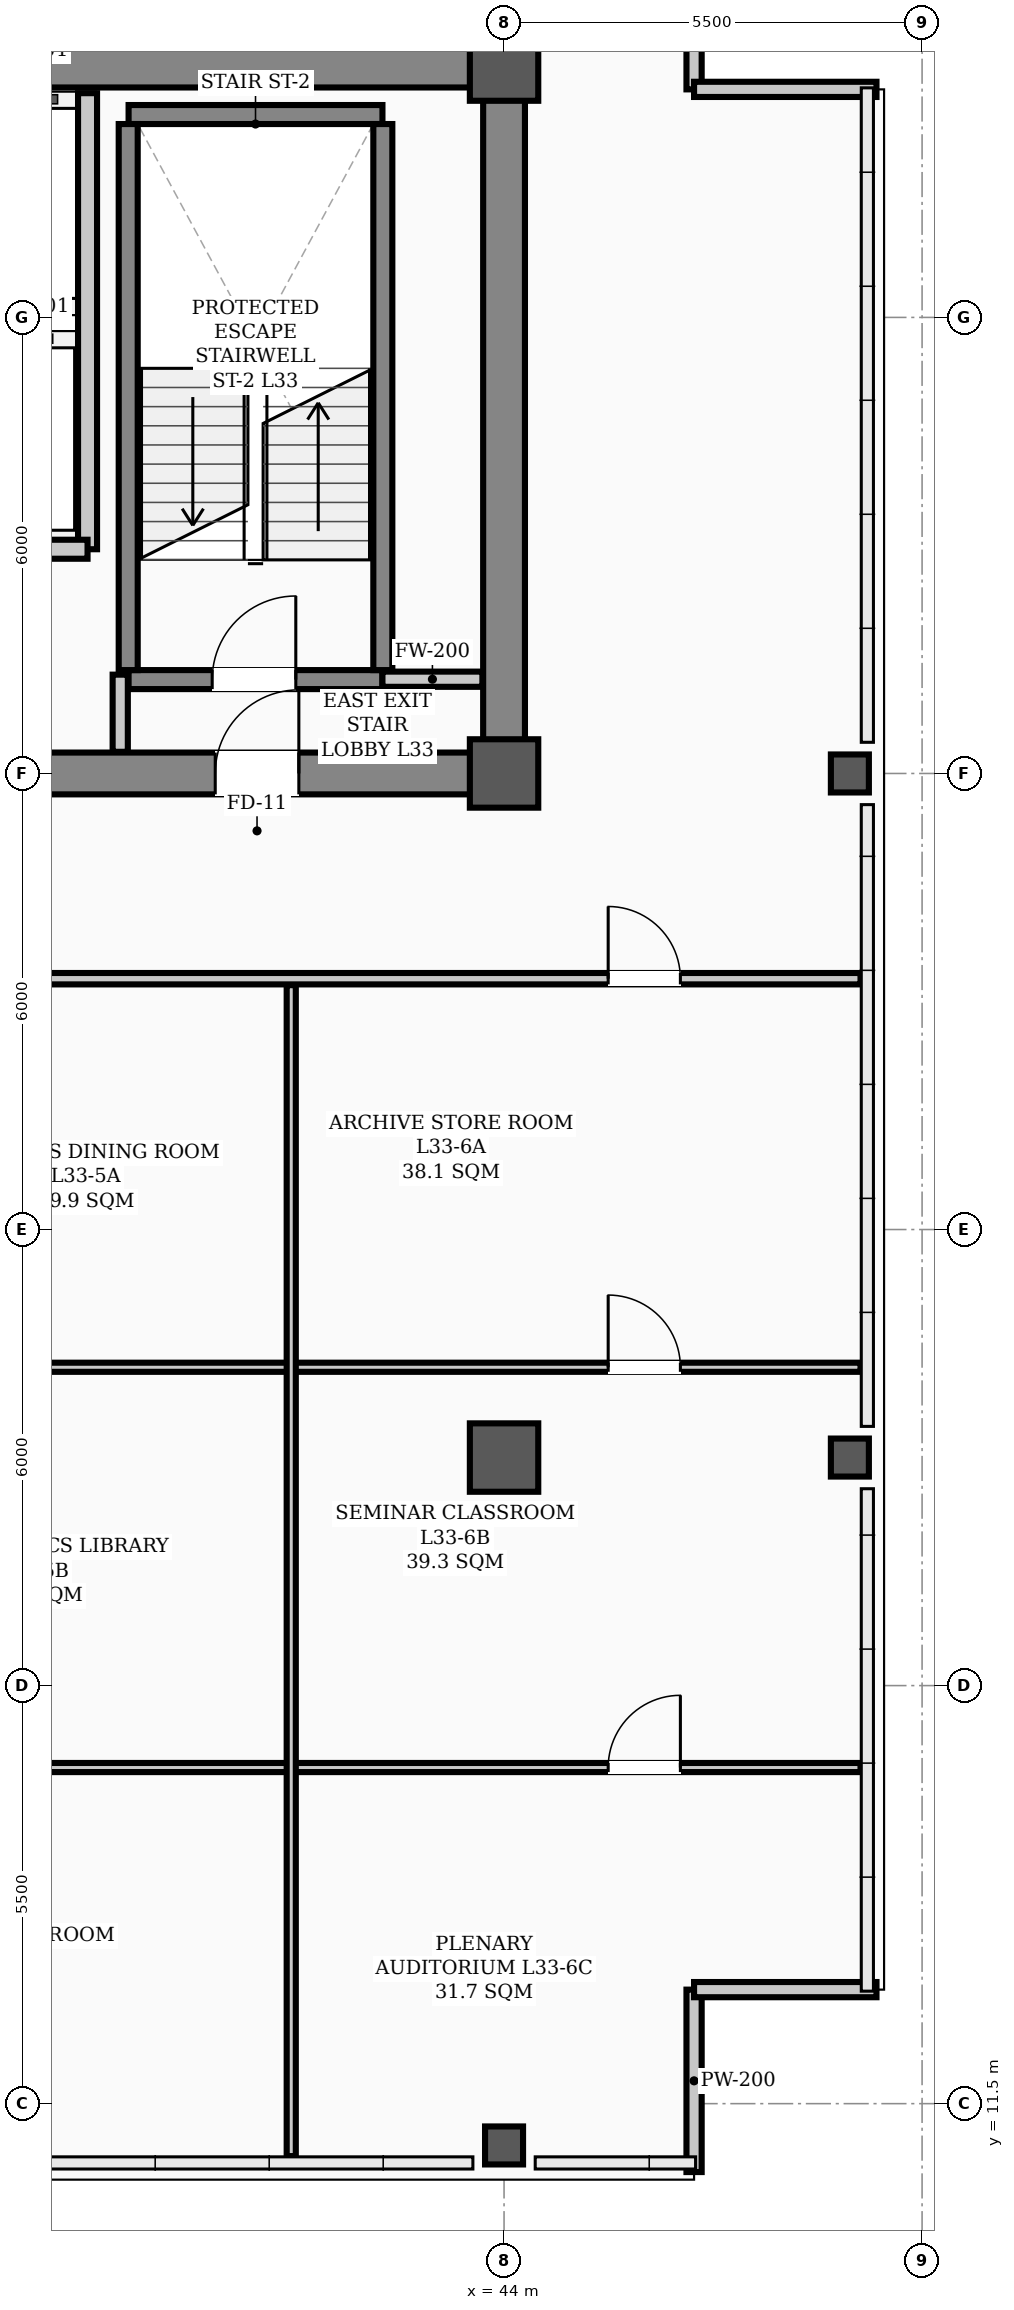
"""IFC4 building model, lengths in metres.
Left out: names, types, materials, properties, quantities, classifications, styles, units other than length and angle.
Written with IfcOpenShell. Run it as: python <this file> out.ifc"""

import sys

from ifc_helpers import new_model, si_unit, direction, frame, frame_2d, origin, origin_2d, place, context, subcontext, project, spatial, rectangle, hollow_rectangle, extrude, element, fill, save


model = new_model("IFC4")
c1 = context("Model", 3, precision=1e-05, world=origin(), true_north=direction((0.0, 1.0)))
c2 = subcontext(c1, "Body", "Model", "MODEL_VIEW")
j1 = project(units=[si_unit("LENGTHUNIT", "METRE"), si_unit("PLANEANGLEUNIT", "RADIAN")], contexts=[c1])
p1 = place(None, origin())
s1 = spatial("IfcSite", under=j1, at=p1, CompositionType="ELEMENT")
p2 = place(p1, origin())
s2 = spatial("IfcBuilding", under=s1, at=p2, CompositionType="ELEMENT")
p3 = place(p2, frame((0.0, 0.0, 134.4)))
s3 = spatial("IfcBuildingStorey", under=s2, at=p3, CompositionType="ELEMENT", Elevation=134.4)
for number, where, z_axis, x_axis in (
    (1, (44.0, 29.0, 0.0), (0.0, 0.0, 1.0), (1.0, 0.0, 0.0)),
    (2, (44.0, 38.3, 0.0), (0.0, 0.0, 1.0), (1.0, 0.0, 0.0)),
    (3, (44.0, 20.0, 0.0), (0.0, 0.0, 1.0), (1.0, 0.0, 0.0)),
):
    element("IfcColumn", number, at=place(p3, frame(where, z_axis=z_axis, x_axis=x_axis)), inside=s3, PredefinedType="COLUMN", context=c2, shape_type="SweptSolid", body=[
        extrude(hollow_rectangle(XDim=0.9, YDim=0.9, WallThickness=0.035, InnerFilletRadius=0.017, OuterFilletRadius=0.052, at=origin_2d()), origin(), (0.0, 0.0, 1.0), 3.9),
    ])
for number, where, z_axis, x_axis in (
    (4, (44.0, 10.95, 0.0), (0.0, 0.0, 1.0), (1.0, 0.0, 0.0)),
    (5, (48.55, 20.0, 0.0), (0.0, 0.0, 1.0), (1.0, 0.0, 0.0)),
    (6, (48.55, 29.0, 0.0), (0.0, 0.0, 1.0), (1.0, 0.0, 0.0)),
):
    element("IfcColumn", number, at=place(p3, frame(where, z_axis=z_axis, x_axis=x_axis)), inside=s3, PredefinedType="COLUMN", context=c2, shape_type="SweptSolid", body=[
        extrude(hollow_rectangle(XDim=0.5, YDim=0.5, WallThickness=0.024, InnerFilletRadius=0.012, OuterFilletRadius=0.036, at=origin_2d()), origin(), (0.0, 0.0, 1.0), 3.9),
    ])
for number, where, z_axis, x_axis in (
    (7, (46.5, 10.6, 0.0), (0.0, 0.0, 1.0), (0.0, 1.0, 0.0)),
    (8, (46.5, 13.0, 0.0), (0.0, 0.0, 1.0), (1.0, 0.0, 0.0)),
    (9, (46.5, 40.4, 0.0), (0.0, 0.0, 1.0), (0.0, -1.0, 0.0)),
    (10, (46.5, 38.0, 0.0), (0.0, 0.0, 1.0), (1.0, 0.0, 0.0)),
):
    element("IfcWall", number, at=place(p3, frame(where, z_axis=z_axis, x_axis=x_axis)), inside=s3, PredefinedType="PARAPET", context=c2, shape_type="SweptSolid", body=[
        extrude(rectangle(XDim=2.4, YDim=0.2, at=frame_2d((1.2, 0.0))), origin(), (0.0, 0.0, 1.0), 1.2),
    ])
p4 = place(p3, frame((13.5, 29.0, 0.0), z_axis=(0.0, 0.0, 1.0), x_axis=(1.0, 0.0, 0.0)))
e11 = element("IfcWall", 11, at=p4, inside=s3, PredefinedType="SHEAR", context=c2, shape_type="SweptSolid", body=[
    extrude(rectangle(XDim=30.5, YDim=0.55, at=frame_2d((15.25, 0.0))), origin(), (0.0, 0.0, 1.0), 3.72),
])
p5 = place(p4, frame((1.75, 0.0, 0.0)))
e12 = element("IfcOpeningElement", 12, at=p5, cuts=e11, PredefinedType="OPENING", context=c2, shape_type="SweptSolid", body=[
    extrude(rectangle(XDim=1.1, YDim=2.08, at=frame_2d((0.55, 1.04))), frame((0.0, 0.285, 0.0), z_axis=(0.0, -1.0, 0.0), x_axis=(1.0, 0.0, 0.0)), (0.0, 0.0, 1.0), 0.57),
])
p6 = place(p4, frame((26.7, 0.0, 0.0)))
e13 = element("IfcOpeningElement", 13, at=p6, cuts=e11, PredefinedType="OPENING", context=c2, shape_type="SweptSolid", body=[
    extrude(rectangle(XDim=1.1, YDim=2.08, at=frame_2d((0.55, 1.04))), frame((0.0, 0.285, 0.0), z_axis=(0.0, -1.0, 0.0), x_axis=(1.0, 0.0, 0.0)), (0.0, 0.0, 1.0), 0.57),
])
p7 = place(p4, frame((6.8, 0.0, 0.0)))
e14 = element("IfcOpeningElement", 14, at=p7, cuts=e11, PredefinedType="OPENING", context=c2, shape_type="SweptSolid", body=[
    extrude(rectangle(XDim=1.1, YDim=2.08, at=frame_2d((0.55, 1.04))), frame((0.0, 0.285, 0.0), z_axis=(0.0, -1.0, 0.0), x_axis=(1.0, 0.0, 0.0)), (0.0, 0.0, 1.0), 0.57),
])
p8 = place(p4, frame((13.2, 0.0, 0.0)))
e15 = element("IfcOpeningElement", 15, at=p8, cuts=e11, PredefinedType="OPENING", context=c2, shape_type="SweptSolid", body=[
    extrude(rectangle(XDim=1.6, YDim=2.08, at=frame_2d((0.8, 1.04))), frame((0.0, 0.285, 0.0), z_axis=(0.0, -1.0, 0.0), x_axis=(1.0, 0.0, 0.0)), (0.0, 0.0, 1.0), 0.57),
])
p9 = place(p4, frame((19.5, 0.0, 0.0)))
e16 = element("IfcOpeningElement", 16, at=p9, cuts=e11, PredefinedType="OPENING", context=c2, shape_type="SweptSolid", body=[
    extrude(rectangle(XDim=0.9, YDim=2.08, at=frame_2d((0.45, 1.04))), frame((0.0, 0.285, 0.0), z_axis=(0.0, -1.0, 0.0), x_axis=(1.0, 0.0, 0.0)), (0.0, 0.0, 1.0), 0.57),
])
p10 = place(p4, frame((21.55, 0.0, 0.0)))
e17 = element("IfcOpeningElement", 17, at=p10, cuts=e11, PredefinedType="OPENING", context=c2, shape_type="SweptSolid", body=[
    extrude(rectangle(XDim=0.9, YDim=2.08, at=frame_2d((0.45, 1.04))), frame((0.0, 0.285, 0.0), z_axis=(0.0, -1.0, 0.0), x_axis=(1.0, 0.0, 0.0)), (0.0, 0.0, 1.0), 0.57),
])
p11 = place(p3, frame((13.5, 38.3, 0.0), z_axis=(0.0, 0.0, 1.0), x_axis=(1.0, 0.0, 0.0)))
e18 = element("IfcWall", 18, at=p11, inside=s3, PredefinedType="SHEAR", context=c2, shape_type="SweptSolid", body=[
    extrude(rectangle(XDim=30.5, YDim=0.55, at=frame_2d((15.25, 0.0))), origin(), (0.0, 0.0, 1.0), 3.72),
])
p12 = place(p3, frame((44.0, 29.35, 0.0), z_axis=(0.0, 0.0, 1.0), x_axis=(0.0, 1.0, 0.0)))
e19 = element("IfcWall", 19, at=p12, inside=s3, PredefinedType="SHEAR", context=c2, shape_type="SweptSolid", body=[
    extrude(rectangle(XDim=8.6, YDim=0.55, at=frame_2d((4.3, 0.0))), origin(), (0.0, 0.0, 1.0), 3.72),
])
p13 = place(p3, frame((39.06, 30.235, 0.0), z_axis=(0.0, 0.0, 1.0), x_axis=(1.0, 0.0, 0.0)))
e20 = element("IfcWall", 20, at=p13, inside=s3, PredefinedType="STANDARD", context=c2, shape_type="SweptSolid", body=[
    extrude(rectangle(XDim=3.34, YDim=0.25, at=frame_2d((1.67, 0.0))), origin(), (0.0, 0.0, 1.0), 3.72),
])
p14 = place(p13, frame((1.1, 0.0, 0.0)))
e21 = element("IfcOpeningElement", 21, at=p14, cuts=e20, PredefinedType="OPENING", context=c2, shape_type="SweptSolid", body=[
    extrude(rectangle(XDim=1.1, YDim=2.08, at=frame_2d((0.55, 1.04))), frame((0.0, 0.135, 0.0), z_axis=(0.0, -1.0, 0.0), x_axis=(1.0, 0.0, 0.0)), (0.0, 0.0, 1.0), 0.27),
])
p15 = place(p3, frame((39.06, 37.669, 0.0), z_axis=(0.0, 0.0, 1.0), x_axis=(1.0, 0.0, 0.0)))
e22 = element("IfcWall", 22, at=p15, inside=s3, PredefinedType="STANDARD", context=c2, shape_type="SweptSolid", body=[
    extrude(rectangle(XDim=3.34, YDim=0.25, at=frame_2d((1.67, 0.0))), origin(), (0.0, 0.0, 1.0), 3.72),
])
for number, where, z_axis, x_axis in (
    (23, (39.055, 30.36, 0.0), (0.0, 0.0, 1.0), (0.0, 1.0, 0.0)),
    (24, (42.405, 30.36, 0.0), (0.0, 0.0, 1.0), (0.0, 1.0, 0.0)),
):
    element("IfcWall", number, at=place(p3, frame(where, z_axis=z_axis, x_axis=x_axis)), inside=s3, PredefinedType="STANDARD", context=c2, shape_type="SweptSolid", body=[
        extrude(rectangle(XDim=7.184, YDim=0.25, at=frame_2d((3.592, 0.0))), origin(), (0.0, 0.0, 1.0), 3.72),
    ])
p16 = place(p3, frame((38.52, 31.95, 0.0), z_axis=(0.0, 0.0, 1.0), x_axis=(0.0, 1.0, 0.0)))
e25 = element("IfcWall", 25, at=p16, inside=s3, PredefinedType="STANDARD", context=c2, shape_type="SweptSolid", body=[
    extrude(rectangle(XDim=6.0, YDim=0.25, at=frame_2d((3.0, 0.0))), origin(), (0.0, 0.0, 1.0), 3.48),
])
p17 = place(p3, frame((36.62, 31.95, 0.0), z_axis=(0.0, 0.0, 1.0), x_axis=(1.0, 0.0, 0.0)))
e26 = element("IfcWall", 26, at=p17, inside=s3, PredefinedType="STANDARD", context=c2, shape_type="SweptSolid", body=[
    extrude(rectangle(XDim=1.9, YDim=0.25, at=frame_2d((0.95, 0.0))), origin(), (0.0, 0.0, 1.0), 3.48),
])
p18 = place(p3, frame((42.4, 30.24, 0.0), z_axis=(0.0, 0.0, 1.0), x_axis=(1.0, 0.0, 0.0)))
e27 = element("IfcWall", 27, at=p18, inside=s3, PredefinedType="STANDARD", context=c2, shape_type="SweptSolid", body=[
    extrude(rectangle(XDim=1.315, YDim=0.2, at=frame_2d((0.658, 0.0))), origin(), (0.0, 0.0, 1.0), 3.1),
])
p19 = place(p3, frame((2.31, 26.3, 0.0), z_axis=(0.0, 0.0, 1.0), x_axis=(1.0, 0.0, 0.0)))
e28 = element("IfcWall", 28, at=p19, inside=s3, PredefinedType="PARTITIONING", context=c2, shape_type="SweptSolid", body=[
    extrude(rectangle(XDim=46.38, YDim=0.15, at=frame_2d((23.19, 0.0))), origin(), (0.0, 0.0, 1.0), 3.1),
])
p20 = place(p19, frame((12.515, 0.0, 0.0)))
e29 = element("IfcOpeningElement", 29, at=p20, cuts=e28, PredefinedType="OPENING", context=c2, shape_type="SweptSolid", body=[
    extrude(rectangle(XDim=0.95, YDim=2.08, at=frame_2d((0.475, 1.04))), frame((0.0, 0.085, 0.0), z_axis=(0.0, -1.0, 0.0), x_axis=(1.0, 0.0, 0.0)), (0.0, 0.0, 1.0), 0.17),
])
p21 = place(p19, frame((18.615, 0.0, 0.0)))
e30 = element("IfcOpeningElement", 30, at=p21, cuts=e28, PredefinedType="OPENING", context=c2, shape_type="SweptSolid", body=[
    extrude(rectangle(XDim=0.95, YDim=2.08, at=frame_2d((0.475, 1.04))), frame((0.0, 0.085, 0.0), z_axis=(0.0, -1.0, 0.0), x_axis=(1.0, 0.0, 0.0)), (0.0, 0.0, 1.0), 0.17),
])
p22 = place(p19, frame((26.115, 0.0, 0.0)))
e31 = element("IfcOpeningElement", 31, at=p22, cuts=e28, PredefinedType="OPENING", context=c2, shape_type="SweptSolid", body=[
    extrude(rectangle(XDim=0.95, YDim=2.08, at=frame_2d((0.475, 1.04))), frame((0.0, 0.085, 0.0), z_axis=(0.0, -1.0, 0.0), x_axis=(1.0, 0.0, 0.0)), (0.0, 0.0, 1.0), 0.17),
])
p23 = place(p19, frame((31.665, 0.0, 0.0)))
e32 = element("IfcOpeningElement", 32, at=p23, cuts=e28, PredefinedType="OPENING", context=c2, shape_type="SweptSolid", body=[
    extrude(rectangle(XDim=0.95, YDim=2.08, at=frame_2d((0.475, 1.04))), frame((0.0, 0.085, 0.0), z_axis=(0.0, -1.0, 0.0), x_axis=(1.0, 0.0, 0.0)), (0.0, 0.0, 1.0), 0.17),
])
p24 = place(p19, frame((43.06, 0.0, 0.0)))
e33 = element("IfcOpeningElement", 33, at=p24, cuts=e28, PredefinedType="OPENING", context=c2, shape_type="SweptSolid", body=[
    extrude(rectangle(XDim=0.95, YDim=2.08, at=frame_2d((0.475, 1.04))), frame((0.0, 0.085, 0.0), z_axis=(0.0, -1.0, 0.0), x_axis=(1.0, 0.0, 0.0)), (0.0, 0.0, 1.0), 0.17),
])
p25 = place(p3, frame((33.4, 21.188, 0.0), z_axis=(0.0, 0.0, 1.0), x_axis=(1.0, 0.0, 0.0)))
e34 = element("IfcWall", 34, at=p25, inside=s3, PredefinedType="PARTITIONING", context=c2, shape_type="SweptSolid", body=[
    extrude(rectangle(XDim=7.8, YDim=0.12, at=frame_2d((3.9, 0.0))), origin(), (0.0, 0.0, 1.0), 3.1),
])
p26 = place(p25, frame((0.575, 0.0, 0.0)))
e35 = element("IfcOpeningElement", 35, at=p26, cuts=e34, PredefinedType="OPENING", context=c2, shape_type="SweptSolid", body=[
    extrude(rectangle(XDim=0.95, YDim=2.08, at=frame_2d((0.475, 1.04))), frame((0.0, 0.07, 0.0), z_axis=(0.0, -1.0, 0.0), x_axis=(1.0, 0.0, 0.0)), (0.0, 0.0, 1.0), 0.14),
])
p27 = place(p3, frame((33.4, 15.922, 0.0), z_axis=(0.0, 0.0, 1.0), x_axis=(1.0, 0.0, 0.0)))
e36 = element("IfcWall", 36, at=p27, inside=s3, PredefinedType="PARTITIONING", context=c2, shape_type="SweptSolid", body=[
    extrude(rectangle(XDim=7.8, YDim=0.12, at=frame_2d((3.9, 0.0))), origin(), (0.0, 0.0, 1.0), 3.1),
])
p28 = place(p27, frame((0.575, 0.0, 0.0)))
e37 = element("IfcOpeningElement", 37, at=p28, cuts=e36, PredefinedType="OPENING", context=c2, shape_type="SweptSolid", body=[
    extrude(rectangle(XDim=0.95, YDim=2.08, at=frame_2d((0.475, 1.04))), frame((0.0, 0.07, 0.0), z_axis=(0.0, -1.0, 0.0), x_axis=(1.0, 0.0, 0.0)), (0.0, 0.0, 1.0), 0.14),
])
p29 = place(p3, frame((41.2, 21.188, 0.0), z_axis=(0.0, 0.0, 1.0), x_axis=(1.0, 0.0, 0.0)))
e38 = element("IfcWall", 38, at=p29, inside=s3, PredefinedType="PARTITIONING", context=c2, shape_type="SweptSolid", body=[
    extrude(rectangle(XDim=7.49, YDim=0.12, at=frame_2d((3.745, 0.0))), origin(), (0.0, 0.0, 1.0), 3.1),
])
p30 = place(p29, frame((4.17, 0.0, 0.0)))
e39 = element("IfcOpeningElement", 39, at=p30, cuts=e38, PredefinedType="OPENING", context=c2, shape_type="SweptSolid", body=[
    extrude(rectangle(XDim=0.95, YDim=2.08, at=frame_2d((0.475, 1.04))), frame((0.0, 0.07, 0.0), z_axis=(0.0, -1.0, 0.0), x_axis=(1.0, 0.0, 0.0)), (0.0, 0.0, 1.0), 0.14),
])
p31 = place(p3, frame((41.2, 15.922, 0.0), z_axis=(0.0, 0.0, 1.0), x_axis=(1.0, 0.0, 0.0)))
e40 = element("IfcWall", 40, at=p31, inside=s3, PredefinedType="PARTITIONING", context=c2, shape_type="SweptSolid", body=[
    extrude(rectangle(XDim=7.49, YDim=0.12, at=frame_2d((3.745, 0.0))), origin(), (0.0, 0.0, 1.0), 3.1),
])
p32 = place(p31, frame((4.17, 0.0, 0.0)))
e41 = element("IfcOpeningElement", 41, at=p32, cuts=e40, PredefinedType="OPENING", context=c2, shape_type="SweptSolid", body=[
    extrude(rectangle(XDim=0.95, YDim=2.08, at=frame_2d((0.475, 1.04))), frame((0.0, 0.07, 0.0), z_axis=(0.0, -1.0, 0.0), x_axis=(1.0, 0.0, 0.0)), (0.0, 0.0, 1.0), 0.14),
])
p33 = place(p3, frame((38.95, 29.285, 0.0), z_axis=(0.0, 0.0, 1.0), x_axis=(0.0, 1.0, 0.0)))
e42 = element("IfcWall", 42, at=p33, inside=s3, PredefinedType="STANDARD", context=c2, shape_type="SweptSolid", body=[
    extrude(rectangle(XDim=1.015, YDim=0.2, at=frame_2d((0.508, 0.0))), origin(), (0.0, 0.0, 1.0), 3.3),
])
p34 = place(p3, frame((41.2, 10.81, 0.0), z_axis=(0.0, 0.0, 1.0), x_axis=(0.0, 1.0, 0.0)))
e43 = element("IfcWall", 43, at=p34, inside=s3, PredefinedType="PARTITIONING", context=c2, shape_type="SweptSolid", body=[
    extrude(rectangle(XDim=15.405, YDim=0.12, at=frame_2d((7.703, 0.0))), origin(), (0.0, 0.0, 1.0), 3.0),
])
p35 = place(p14, origin())
e44 = element("IfcDoor", 44, at=p35, inside=s3, OperationType="SINGLE_SWING_RIGHT", PredefinedType="DOOR", context=c2, shape_type="SweptSolid", body=[
    extrude(rectangle(XDim=1.1, YDim=2.08, at=frame_2d((0.55, 1.04))), frame((0.0, 0.025, 0.0), z_axis=(0.0, -1.0, 0.0), x_axis=(1.0, 0.0, 0.0)), (0.0, 0.0, 1.0), 0.05),
])
fill(e21, e44)
p36 = place(p6, origin())
e45 = element("IfcDoor", 45, at=p36, inside=s3, OperationType="SINGLE_SWING_RIGHT", PredefinedType="DOOR", context=c2, shape_type="SweptSolid", body=[
    extrude(rectangle(XDim=1.1, YDim=2.08, at=frame_2d((0.55, 1.04))), frame((0.0, 0.025, 0.0), z_axis=(0.0, -1.0, 0.0), x_axis=(1.0, 0.0, 0.0)), (0.0, 0.0, 1.0), 0.05),
])
fill(e13, e45)
p37 = place(p30, origin())
e46 = element("IfcDoor", 46, at=p37, inside=s3, OperationType="SINGLE_SWING_LEFT", PredefinedType="DOOR", context=c2, shape_type="SweptSolid", body=[
    extrude(rectangle(XDim=0.95, YDim=2.08, at=frame_2d((0.475, 1.04))), frame((0.0, 0.025, 0.0), z_axis=(0.0, -1.0, 0.0), x_axis=(1.0, 0.0, 0.0)), (0.0, 0.0, 1.0), 0.05),
])
fill(e39, e46)
p38 = place(p32, origin())
e47 = element("IfcDoor", 47, at=p38, inside=s3, OperationType="SINGLE_SWING_RIGHT", PredefinedType="DOOR", context=c2, shape_type="SweptSolid", body=[
    extrude(rectangle(XDim=0.95, YDim=2.08, at=frame_2d((0.475, 1.04))), frame((0.0, 0.025, 0.0), z_axis=(0.0, -1.0, 0.0), x_axis=(1.0, 0.0, 0.0)), (0.0, 0.0, 1.0), 0.05),
])
fill(e41, e47)
p39 = place(p24, origin())
e48 = element("IfcDoor", 48, at=p39, inside=s3, OperationType="SINGLE_SWING_LEFT", PredefinedType="DOOR", context=c2, shape_type="SweptSolid", body=[
    extrude(rectangle(XDim=0.95, YDim=2.08, at=frame_2d((0.475, 1.04))), frame((0.0, 0.025, 0.0), z_axis=(0.0, -1.0, 0.0), x_axis=(1.0, 0.0, 0.0)), (0.0, 0.0, 1.0), 0.05),
])
fill(e33, e48)
save(model, sys.argv[1])
